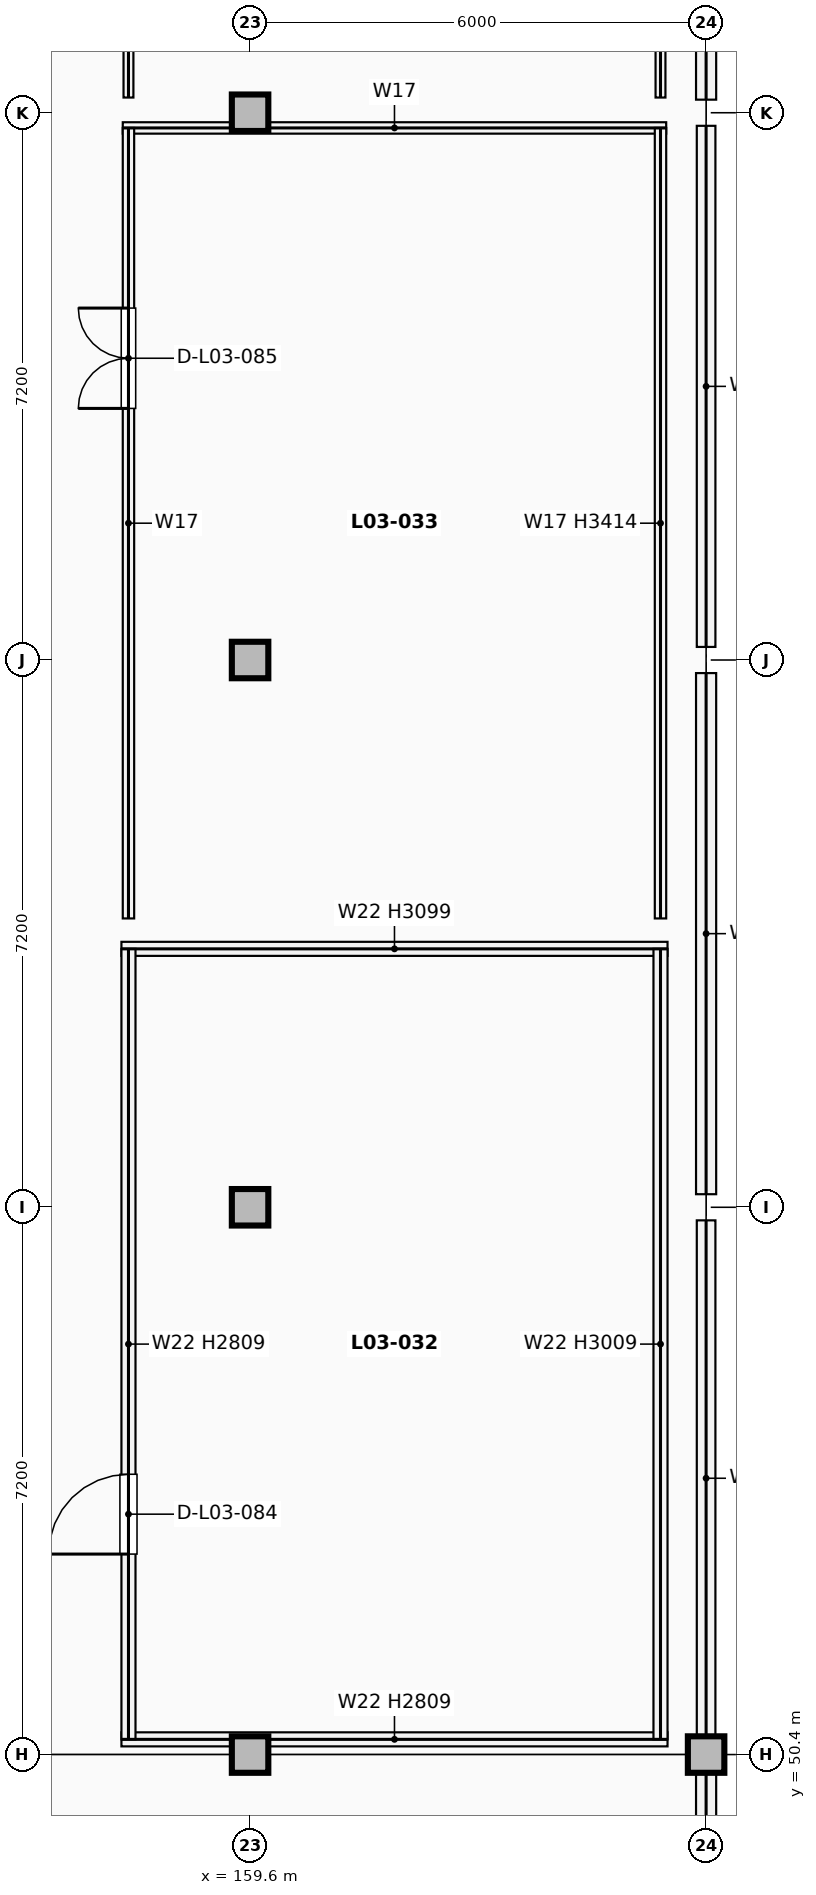
"""IFC4 building model, lengths in metres.
Left out: names, types, materials, properties, quantities, classifications, styles, units other than length and angle.
Written with IfcOpenShell. Run it as: python <this file> out.ifc"""

import sys

from ifc_helpers import new_model, si_unit, direction, frame, frame_2d, origin, origin_2d, place, context, subcontext, project, spatial, rectangle, extrude, element, fill, save


model = new_model("IFC4")
c1 = context("Model", 3, precision=1e-05, world=origin(), true_north=direction((0.0, 1.0)))
c2 = subcontext(c1, "Body", "Model", "MODEL_VIEW")
j1 = project(units=[si_unit("LENGTHUNIT", "METRE"), si_unit("PLANEANGLEUNIT", "RADIAN")], contexts=[c1])
p1 = place(None, origin())
s1 = spatial("IfcSite", under=j1, at=p1, CompositionType="ELEMENT")
p2 = place(p1, origin())
s2 = spatial("IfcBuilding", under=s1, at=p2, CompositionType="ELEMENT")
p3 = place(p2, frame((0.0, 0.0, 13.6)))
s3 = spatial("IfcBuildingStorey", under=s2, at=p3, CompositionType="ELEMENT", Elevation=13.6)
for number, where, z_axis, x_axis in (
    (1, (159.6, 50.4, 0.0), (0.0, 0.0, 1.0), (1.0, 0.0, 0.0)),
    (2, (159.6, 57.6, 0.0), (0.0, 0.0, 1.0), (1.0, 0.0, 0.0)),
    (3, (159.6, 64.8, 0.0), (0.0, 0.0, 1.0), (1.0, 0.0, 0.0)),
    (4, (159.6, 72.0, 0.0), (0.0, 0.0, 1.0), (1.0, 0.0, 0.0)),
    (5, (165.6, 50.4, 0.0), (0.0, 0.0, 1.0), (1.0, 0.0, 0.0)),
):
    element("IfcColumn", number, at=place(p3, frame(where, z_axis=z_axis, x_axis=x_axis)), inside=s3, PredefinedType="COLUMN", context=c2, shape_type="SweptSolid", body=[
        extrude(rectangle(XDim=0.48, YDim=0.48, at=origin_2d()), origin(), (0.0, 0.0, 1.0), 3.74),
    ])
p4 = place(p3, frame((165.6, 44.642, 0.0), z_axis=(0.0, 0.0, 1.0), x_axis=(0.0, 1.0, 0.0)))
e6 = element("IfcWall", 6, at=p4, inside=s3, PredefinedType="SOLIDWALL", context=c2, shape_type="SweptSolid", body=[
    extrude(rectangle(XDim=5.516, YDim=0.265, at=frame_2d((2.758, 0.0))), origin(), (0.0, 0.0, 1.0), 2.999),
])
p5 = place(p3, frame((165.6, 50.642, 0.0), z_axis=(0.0, 0.0, 1.0), x_axis=(0.0, 1.0, 0.0)))
e7 = element("IfcWall", 7, at=p5, inside=s3, PredefinedType="SOLIDWALL", context=c2, shape_type="SweptSolid", body=[
    extrude(rectangle(XDim=6.786, YDim=0.245, at=frame_2d((3.393, 0.0))), origin(), (0.0, 0.0, 1.0), 2.999),
])
p6 = place(p3, frame((165.6, 57.772, 0.0), z_axis=(0.0, 0.0, 1.0), x_axis=(0.0, 1.0, 0.0)))
e8 = element("IfcWall", 8, at=p6, inside=s3, PredefinedType="SOLIDWALL", context=c2, shape_type="SweptSolid", body=[
    extrude(rectangle(XDim=6.856, YDim=0.265, at=frame_2d((3.428, 0.0))), origin(), (0.0, 0.0, 1.0), 3.149),
])
p7 = place(p3, frame((165.6, 64.972, 0.0), z_axis=(0.0, 0.0, 1.0), x_axis=(0.0, 1.0, 0.0)))
e9 = element("IfcWall", 9, at=p7, inside=s3, PredefinedType="SOLIDWALL", context=c2, shape_type="SweptSolid", body=[
    extrude(rectangle(XDim=6.856, YDim=0.245, at=frame_2d((3.428, 0.0))), origin(), (0.0, 0.0, 1.0), 3.149),
])
p8 = place(p3, frame((165.6, 72.172, 0.0), z_axis=(0.0, 0.0, 1.0), x_axis=(0.0, 1.0, 0.0)))
e10 = element("IfcWall", 10, at=p8, inside=s3, PredefinedType="SOLIDWALL", context=c2, shape_type="SweptSolid", body=[
    extrude(rectangle(XDim=6.786, YDim=0.265, at=frame_2d((3.393, 0.0))), origin(), (0.0, 0.0, 1.0), 2.999),
])
p9 = place(p3, frame((157.907, 50.6, 0.0), z_axis=(0.0, 0.0, 1.0), x_axis=(1.0, 0.0, 0.0)))
e11 = element("IfcWall", 11, at=p9, inside=s3, PredefinedType="PARTITIONING", context=c2, shape_type="SweptSolid", body=[
    extrude(rectangle(XDim=7.185, YDim=0.185, at=frame_2d((3.593, 0.0))), origin(), (0.0, 0.0, 1.0), 2.809),
])
p10 = place(p3, frame((157.907, 61.0, 0.0), z_axis=(0.0, 0.0, 1.0), x_axis=(1.0, 0.0, 0.0)))
e12 = element("IfcWall", 12, at=p10, inside=s3, PredefinedType="PARTITIONING", context=c2, shape_type="SweptSolid", body=[
    extrude(rectangle(XDim=7.185, YDim=0.185, at=frame_2d((3.593, 0.0))), origin(), (0.0, 0.0, 1.0), 3.099),
])
p11 = place(p3, frame((158.0, 50.6, 0.0), z_axis=(0.0, 0.0, 1.0), x_axis=(0.0, 1.0, 0.0)))
e13 = element("IfcWall", 13, at=p11, inside=s3, PredefinedType="PARTITIONING", context=c2, shape_type="SweptSolid", body=[
    extrude(rectangle(XDim=10.4, YDim=0.185, at=frame_2d((5.2, 0.0))), origin(), (0.0, 0.0, 1.0), 2.809),
])
p12 = place(p11, frame((2.438, 0.0, 0.0)))
e14 = element("IfcOpeningElement", 14, at=p12, cuts=e13, PredefinedType="OPENING", context=c2, shape_type="SweptSolid", body=[
    extrude(rectangle(XDim=1.05, YDim=2.15, at=frame_2d((0.525, 1.075))), frame((0.0, 0.103, 0.0), z_axis=(0.0, -1.0, 0.0), x_axis=(1.0, 0.0, 0.0)), (0.0, 0.0, 1.0), 0.205),
])
p13 = place(p3, frame((165.0, 50.6, 0.0), z_axis=(0.0, 0.0, 1.0), x_axis=(0.0, 1.0, 0.0)))
e15 = element("IfcWall", 15, at=p13, inside=s3, PredefinedType="PARTITIONING", context=c2, shape_type="SweptSolid", body=[
    extrude(rectangle(XDim=10.4, YDim=0.185, at=frame_2d((5.2, 0.0))), origin(), (0.0, 0.0, 1.0), 3.009),
])
p14 = place(p3, frame((157.925, 71.8, 0.0), z_axis=(0.0, 0.0, 1.0), x_axis=(1.0, 0.0, 0.0)))
e16 = element("IfcWall", 16, at=p14, inside=s3, PredefinedType="PARTITIONING", context=c2, shape_type="SweptSolid", body=[
    extrude(rectangle(XDim=7.15, YDim=0.15, at=frame_2d((3.575, 0.0))), origin(), (0.0, 0.0, 1.0), 2.809),
])
p15 = place(p3, frame((158.0, 61.4, 0.0), z_axis=(0.0, 0.0, 1.0), x_axis=(0.0, 1.0, 0.0)))
e17 = element("IfcWall", 17, at=p15, inside=s3, PredefinedType="PARTITIONING", context=c2, shape_type="SweptSolid", body=[
    extrude(rectangle(XDim=10.4, YDim=0.15, at=frame_2d((5.2, 0.0))), origin(), (0.0, 0.0, 1.0), 2.809),
])
p16 = place(p15, frame((6.71, 0.0, 0.0)))
e18 = element("IfcOpeningElement", 18, at=p16, cuts=e17, PredefinedType="OPENING", context=c2, shape_type="SweptSolid", body=[
    extrude(rectangle(XDim=1.32, YDim=2.22, at=frame_2d((0.66, 1.11))), frame((0.0, 0.085, 0.0), z_axis=(0.0, -1.0, 0.0), x_axis=(1.0, 0.0, 0.0)), (0.0, 0.0, 1.0), 0.17),
])
p17 = place(p3, frame((165.0, 61.4, 0.0), z_axis=(0.0, 0.0, 1.0), x_axis=(0.0, 1.0, 0.0)))
e19 = element("IfcWall", 19, at=p17, inside=s3, PredefinedType="PARTITIONING", context=c2, shape_type="SweptSolid", body=[
    extrude(rectangle(XDim=10.4, YDim=0.15, at=frame_2d((5.2, 0.0))), origin(), (0.0, 0.0, 1.0), 3.414),
])
p18 = place(p3, frame((158.0, 72.2, 0.0), z_axis=(0.0, 0.0, 1.0), x_axis=(0.0, 1.0, 0.0)))
e20 = element("IfcWall", 20, at=p18, inside=s3, PredefinedType="PARTITIONING", context=c2, shape_type="SweptSolid", body=[
    extrude(rectangle(XDim=9.6, YDim=0.13, at=frame_2d((4.8, 0.0))), origin(), (0.0, 0.0, 1.0), 2.809),
])
p19 = place(p18, frame((2.245, 0.0, 0.0)))
e21 = element("IfcOpeningElement", 21, at=p19, cuts=e20, PredefinedType="OPENING", context=c2, shape_type="SweptSolid", body=[
    extrude(rectangle(XDim=1.02, YDim=2.18, at=frame_2d((0.51, 1.09))), frame((0.0, 0.075, 0.0), z_axis=(0.0, -1.0, 0.0), x_axis=(1.0, 0.0, 0.0)), (0.0, 0.0, 1.0), 0.15),
])
p20 = place(p3, frame((165.0, 72.2, 0.0), z_axis=(0.0, 0.0, 1.0), x_axis=(0.0, 1.0, 0.0)))
e22 = element("IfcWall", 22, at=p20, inside=s3, PredefinedType="PARTITIONING", context=c2, shape_type="SweptSolid", body=[
    extrude(rectangle(XDim=9.6, YDim=0.13, at=frame_2d((4.8, 0.0))), origin(), (0.0, 0.0, 1.0), 3.009),
])
p21 = place(p12, origin())
e23 = element("IfcDoor", 23, at=p21, inside=s3, OperationType="SINGLE_SWING_LEFT", PredefinedType="DOOR", context=c2, shape_type="SweptSolid", body=[
    extrude(rectangle(XDim=1.05, YDim=2.15, at=frame_2d((0.525, 1.075))), frame((0.0, 0.025, 0.0), z_axis=(0.0, -1.0, 0.0), x_axis=(1.0, 0.0, 0.0)), (0.0, 0.0, 1.0), 0.05),
])
fill(e14, e23)
p22 = place(p16, origin())
e24 = element("IfcDoor", 24, at=p22, inside=s3, OperationType="DOUBLE_DOOR_SINGLE_SWING", PredefinedType="DOOR", context=c2, shape_type="SweptSolid", body=[
    extrude(rectangle(XDim=1.32, YDim=2.22, at=frame_2d((0.66, 1.11))), frame((0.0, 0.025, 0.0), z_axis=(0.0, -1.0, 0.0), x_axis=(1.0, 0.0, 0.0)), (0.0, 0.0, 1.0), 0.05),
])
fill(e18, e24)
save(model, sys.argv[1])
